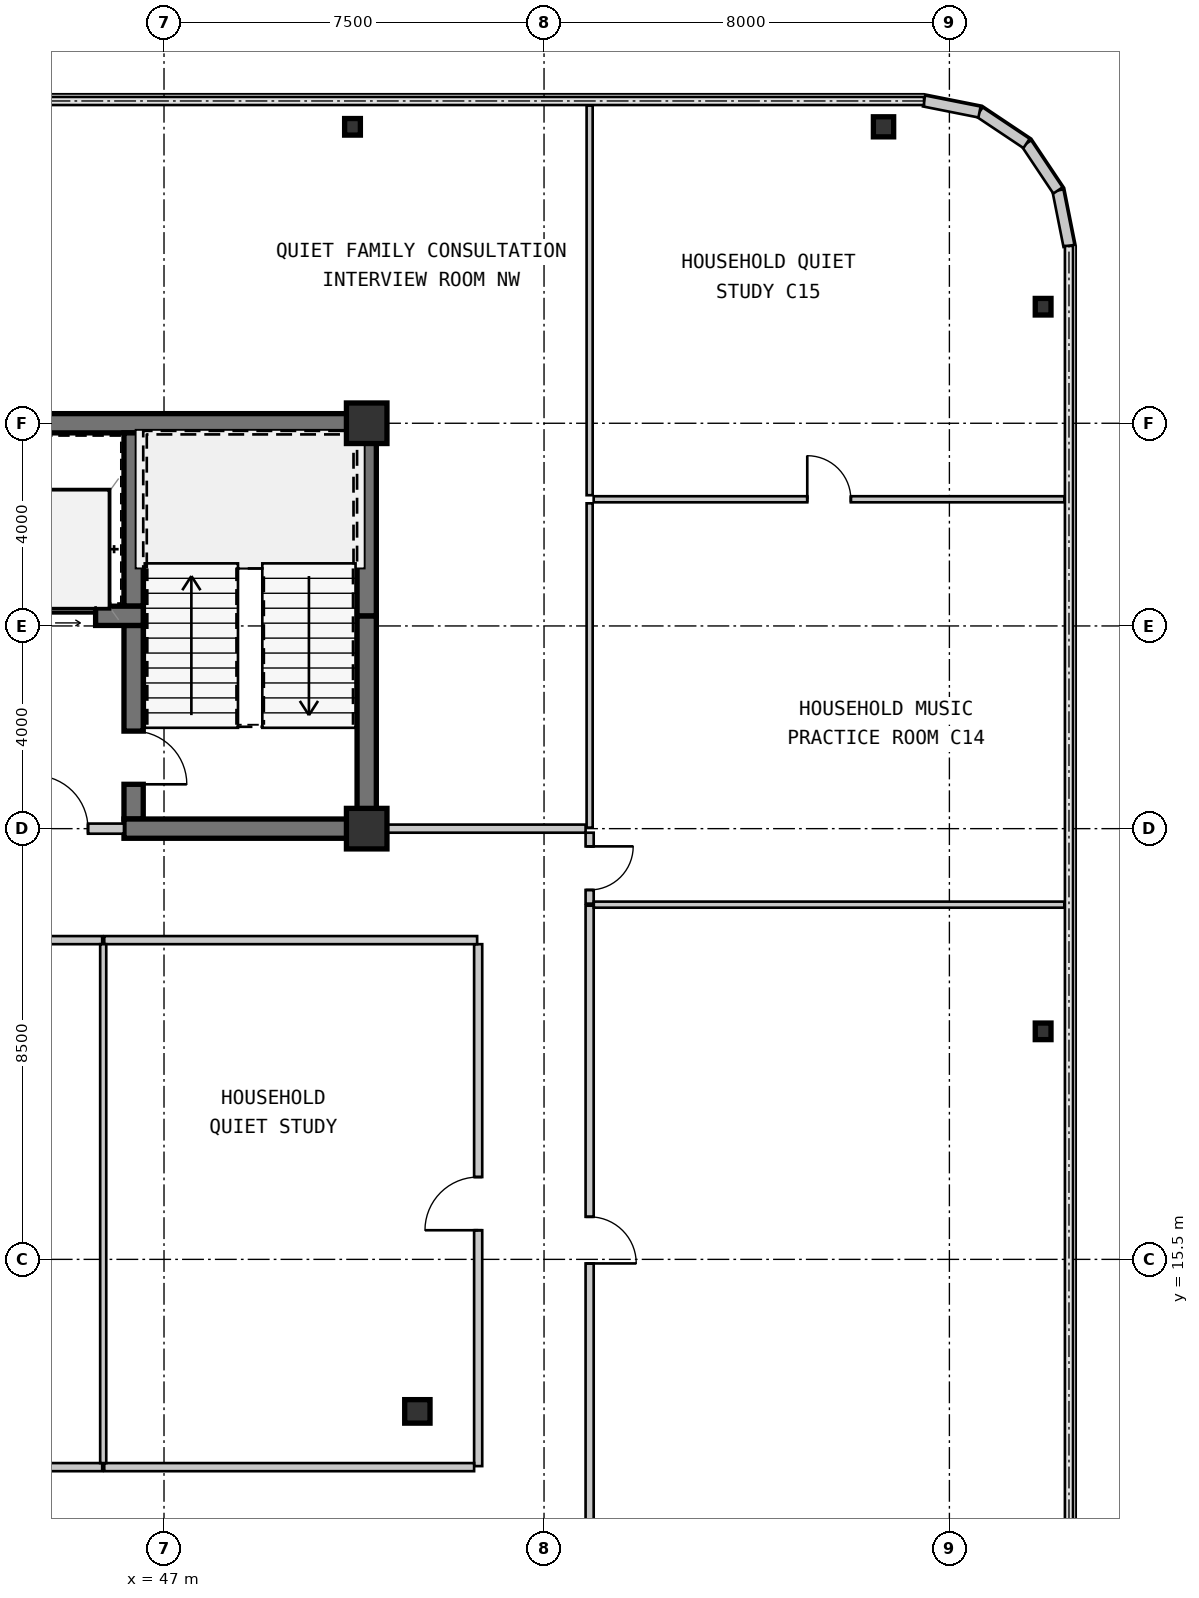
"""IFC4 building model, lengths in metres.
Left out: names, types, materials, properties, quantities, classifications, styles, units other than length and angle.
Written with IfcOpenShell. Run it as: python <this file> out.ifc"""

import sys

from ifc_helpers import new_model, si_unit, direction, frame, frame_2d, origin, origin_2d, place, context, subcontext, project, spatial, rectangle, i_section, extrude, source, transform, mapped, element, fill, save


model = new_model("IFC4")
c1 = context("Model", 3, precision=1e-05, world=origin(), true_north=direction((0.0, 1.0)))
c2 = subcontext(c1, "Body", "Model", "MODEL_VIEW")
j1 = project(units=[si_unit("LENGTHUNIT", "METRE"), si_unit("PLANEANGLEUNIT", "RADIAN")], contexts=[c1])
p1 = place(None, origin())
s1 = spatial("IfcSite", under=j1, at=p1, CompositionType="ELEMENT")
p2 = place(p1, origin())
s2 = spatial("IfcBuilding", under=s1, at=p2, CompositionType="ELEMENT")
p3 = place(p2, frame((0.0, 0.0, 32.55)))
s3 = spatial("IfcBuildingStorey", under=s2, at=p3, CompositionType="ELEMENT", Elevation=32.55)
m1 = source(origin(), c2, "Body", "SweptSolid", [
    extrude(rectangle(XDim=0.8, YDim=0.8, at=origin_2d()), origin(), (0.0, 0.0, 1.0), 3.15),
])
for number, where, z_axis, x_axis in (
    (1, (51.0, 24.0, 0.0), (0.0, 0.0, 1.0), (1.0, 0.0, 0.0)),
    (2, (51.0, 32.0, 0.0), (0.0, 0.0, 1.0), (1.0, 0.0, 0.0)),
):
    element("IfcColumn", number, at=place(p3, frame(where, z_axis=z_axis, x_axis=x_axis)), inside=s3, PredefinedType="COLUMN", context=c2, shape_type="MappedRepresentation", body=[
        mapped(m1, transform((0.0, 0.0, 0.0), scale=1.0)),
    ])
m2 = source(origin(), c2, "Body", "SweptSolid", [
    extrude(i_section(OverallWidth=0.5, OverallDepth=0.464, WebThickness=0.022, FlangeThickness=0.034, at=origin_2d()), origin(), (0.0, 0.0, 1.0), 3.15),
])
p4 = place(p3, frame((52.0, 12.5, 0.0), z_axis=(0.0, 0.0, 1.0), x_axis=(1.0, 0.0, 0.0)))
e3 = element("IfcColumn", 3, at=p4, inside=s3, PredefinedType="COLUMN", context=c2, shape_type="MappedRepresentation", body=[
    mapped(m2, transform((0.0, 0.0, 0.0), scale=1.0)),
])
m3 = source(origin(), c2, "Body", "SweptSolid", [
    extrude(i_section(OverallWidth=0.311, OverallDepth=0.327, WebThickness=0.016, FlangeThickness=0.025, at=origin_2d()), origin(), (0.0, 0.0, 1.0), 3.15),
])
p5 = place(p3, frame((50.72, 37.85, 0.0), z_axis=(0.0, 0.0, 1.0), x_axis=(1.0, 0.0, 0.0)))
e4 = element("IfcColumn", 4, at=p5, inside=s3, PredefinedType="COLUMN", context=c2, shape_type="MappedRepresentation", body=[
    mapped(m3, transform((0.0, 0.0, 0.0), scale=1.0)),
])
m4 = source(origin(), c2, "Body", "SweptSolid", [
    extrude(i_section(OverallWidth=0.4, OverallDepth=0.396, WebThickness=0.022, FlangeThickness=0.034, at=origin_2d()), origin(), (0.0, 0.0, 1.0), 3.15),
])
p6 = place(p3, frame((61.2, 37.85, 0.0), z_axis=(0.0, 0.0, 1.0), x_axis=(1.0, 0.0, 0.0)))
e5 = element("IfcColumn", 5, at=p6, inside=s3, PredefinedType="COLUMN", context=c2, shape_type="MappedRepresentation", body=[
    mapped(m4, transform((0.0, 0.0, 0.0), scale=1.0)),
])
for number, where, z_axis, x_axis in (
    (6, (64.35, 20.0, 0.0), (0.0, 0.0, 1.0), (1.0, 0.0, 0.0)),
    (7, (64.35, 34.3, 0.0), (0.0, 0.0, 1.0), (1.0, 0.0, 0.0)),
):
    element("IfcColumn", number, at=place(p3, frame(where, z_axis=z_axis, x_axis=x_axis)), inside=s3, PredefinedType="COLUMN", context=c2, shape_type="MappedRepresentation", body=[
        mapped(m3, transform((0.0, 0.0, 0.0), scale=1.0)),
    ])
m5 = source(origin(), c2, "Body", "SweptSolid", [
    extrude(rectangle(XDim=1.116, YDim=0.22, at=frame_2d((0.558, 0.0))), origin(), (0.0, 0.0, 1.0), 2.93),
])
for number, where, z_axis, x_axis in (
    (8, (64.86, 35.5, 0.0), (0.0, 0.0, 1.0), (-0.195, 0.981, 0.0)),
    (9, (64.642, 36.594, 0.0), (0.0, 0.0, 1.0), (-0.556, 0.831, 0.0)),
    (10, (64.022, 37.522, 0.0), (0.0, 0.0, 1.0), (-0.831, 0.556, 0.0)),
    (11, (63.094, 38.142, 0.0), (0.0, 0.0, 1.0), (-0.981, 0.195, 0.0)),
):
    element("IfcWall", number, at=place(p3, frame(where, z_axis=z_axis, x_axis=x_axis)), inside=s3, PredefinedType="SOLIDWALL", context=c2, shape_type="MappedRepresentation", body=[
        mapped(m5, transform((0.0, 0.0, 0.0), scale=1.0)),
    ])
m6 = source(origin(), c2, "Body", "SweptSolid", [
    extrude(rectangle(XDim=11.99, YDim=0.38, at=frame_2d((5.995, 0.0))), origin(), (0.0, 0.0, 1.0), 2.93),
])
p7 = place(p3, frame((39.2, 32.0, 0.0), z_axis=(0.0, 0.0, 1.0), x_axis=(1.0, 0.0, 0.0)))
e12 = element("IfcWall", 12, at=p7, inside=s3, PredefinedType="SHEAR", context=c2, shape_type="MappedRepresentation", body=[
    mapped(m6, transform((0.0, 0.0, 0.0), scale=1.0)),
])
m7 = source(origin(), c2, "Body", "SweptSolid", [
    extrude(rectangle(XDim=4.01, YDim=0.38, at=frame_2d((2.005, 0.0))), origin(), (0.0, 0.0, 1.0), 2.93),
])
p8 = place(p3, frame((51.0, 24.19, 0.0), z_axis=(0.0, 0.0, 1.0), x_axis=(0.0, 1.0, 0.0)))
e13 = element("IfcWall", 13, at=p8, inside=s3, PredefinedType="SHEAR", context=c2, shape_type="MappedRepresentation", body=[
    mapped(m7, transform((0.0, 0.0, 0.0), scale=1.0)),
])
m8 = source(origin(), c2, "Body", "SweptSolid", [
    extrude(rectangle(XDim=3.61, YDim=0.38, at=frame_2d((1.805, 0.0))), origin(), (0.0, 0.0, 1.0), 2.93),
])
p9 = place(p3, frame((51.0, 28.2, 0.0), z_axis=(0.0, 0.0, 1.0), x_axis=(0.0, 1.0, 0.0)))
e14 = element("IfcWall", 14, at=p9, inside=s3, PredefinedType="SHEAR", context=c2, shape_type="MappedRepresentation", body=[
    mapped(m8, transform((0.0, 0.0, 0.0), scale=1.0)),
])
m9 = source(origin(), c2, "Body", "SweptSolid", [
    extrude(rectangle(XDim=3.42, YDim=0.38, at=frame_2d((1.71, 0.0))), origin(), (0.0, 0.0, 1.0), 2.93),
])
p10 = place(p3, frame((46.4, 31.81, 0.0), z_axis=(0.0, 0.0, 1.0), x_axis=(0.0, -1.0, 0.0)))
e15 = element("IfcWall", 15, at=p10, inside=s3, PredefinedType="SHEAR", context=c2, shape_type="MappedRepresentation", body=[
    mapped(m9, transform((0.0, 0.0, 0.0), scale=1.0)),
])
m10 = source(origin(), c2, "Body", "SweptSolid", [
    extrude(rectangle(XDim=3.82, YDim=0.38, at=frame_2d((1.91, 0.0))), origin(), (0.0, 0.0, 1.0), 2.93),
])
p11 = place(p3, frame((46.4, 28.01, 0.0), z_axis=(0.0, 0.0, 1.0), x_axis=(0.0, -1.0, 0.0)))
e16 = element("IfcWall", 16, at=p11, inside=s3, PredefinedType="SHEAR", context=c2, shape_type="MappedRepresentation", body=[
    mapped(m10, transform((0.0, 0.0, 0.0), scale=1.0)),
])
m11 = source(origin(), c2, "Body", "SweptSolid", [
    extrude(rectangle(XDim=1.05, YDim=2.1, at=frame_2d((0.525, 1.05))), frame((0.0, 0.2, 0.0), z_axis=(0.0, -1.0, 0.0), x_axis=(1.0, 0.0, 0.0)), (0.0, 0.0, 1.0), 0.4),
])
p12 = place(p11, frame((2.085, 0.0, 0.0)))
e17 = element("IfcOpeningElement", 17, at=p12, cuts=e16, PredefinedType="OPENING", context=c2, shape_type="MappedRepresentation", body=[
    mapped(m11, transform((0.0, 0.0, 0.0), scale=1.0)),
])
m12 = source(origin(), c2, "Body", "SweptSolid", [
    extrude(rectangle(XDim=4.98, YDim=0.38, at=frame_2d((2.49, 0.0))), origin(), (0.0, 0.0, 1.0), 2.93),
])
p13 = place(p3, frame((46.21, 24.0, 0.0), z_axis=(0.0, 0.0, 1.0), x_axis=(1.0, 0.0, 0.0)))
e18 = element("IfcWall", 18, at=p13, inside=s3, PredefinedType="SHEAR", context=c2, shape_type="MappedRepresentation", body=[
    mapped(m12, transform((0.0, 0.0, 0.0), scale=1.0)),
])
m13 = source(origin(), c2, "Body", "SweptSolid", [
    extrude(rectangle(XDim=2.98, YDim=0.38, at=frame_2d((1.49, 0.0))), origin(), (0.0, 0.0, 1.0), 2.93),
])
p14 = place(p3, frame((43.61, 28.2, 0.0), z_axis=(0.0, 0.0, 1.0), x_axis=(1.0, 0.0, 0.0)))
e19 = element("IfcWall", 19, at=p14, inside=s3, PredefinedType="SHEAR", context=c2, shape_type="MappedRepresentation", body=[
    mapped(m13, transform((0.0, 0.0, 0.0), scale=1.0)),
])
m14 = source(origin(), c2, "Body", "SweptSolid", [
    extrude(rectangle(XDim=1.1, YDim=2.15, at=frame_2d((0.55, 1.075))), frame((0.0, 0.2, 0.0), z_axis=(0.0, -1.0, 0.0), x_axis=(1.0, 0.0, 0.0)), (0.0, 0.0, 1.0), 0.4),
])
p15 = place(p14, frame((0.94, 0.0, 0.0)))
e20 = element("IfcOpeningElement", 20, at=p15, cuts=e19, PredefinedType="OPENING", context=c2, shape_type="MappedRepresentation", body=[
    mapped(m14, transform((0.0, 0.0, 0.0), scale=1.0)),
])
m15 = source(origin(), c2, "Body", "SweptSolid", [
    extrude(rectangle(XDim=2.66, YDim=0.2, at=frame_2d((1.33, 0.0))), origin(), (0.0, 0.0, 1.0), 2.397),
])
p16 = place(p3, frame((43.55, 24.0, 0.0), z_axis=(0.0, 0.0, 1.0), x_axis=(1.0, 0.0, 0.0)))
e21 = element("IfcWall", 21, at=p16, inside=s3, PredefinedType="SOLIDWALL", context=c2, shape_type="MappedRepresentation", body=[
    mapped(m15, transform((0.0, 0.0, 0.0), scale=1.0)),
])
m16 = source(origin(), c2, "Body", "SweptSolid", [
    extrude(rectangle(XDim=1.05, YDim=2.1, at=frame_2d((0.525, 1.05))), frame((0.0, 0.11, 0.0), z_axis=(0.0, -1.0, 0.0), x_axis=(1.0, 0.0, 0.0)), (0.0, 0.0, 1.0), 0.22),
])
p17 = place(p16, frame((0.9, 0.0, 0.0)))
e22 = element("IfcOpeningElement", 22, at=p17, cuts=e21, PredefinedType="OPENING", context=c2, shape_type="MappedRepresentation", body=[
    mapped(m16, transform((0.0, 0.0, 0.0), scale=1.0)),
])
m17 = source(origin(), c2, "Body", "SweptSolid", [
    extrude(rectangle(XDim=7.26, YDim=0.16, at=frame_2d((3.63, 0.0))), origin(), (0.0, 0.0, 1.0), 2.93),
])
p18 = place(p3, frame((45.78, 21.8, 0.0), z_axis=(0.0, 0.0, 1.0), x_axis=(-1.0, 0.0, 0.0)))
e23 = element("IfcWall", 23, at=p18, inside=s3, PredefinedType="PARTITIONING", context=c2, shape_type="MappedRepresentation", body=[
    mapped(m17, transform((0.0, 0.0, 0.0), scale=1.0)),
])
m18 = source(origin(), c2, "Body", "SweptSolid", [
    extrude(rectangle(XDim=1.05, YDim=2.1, at=frame_2d((0.525, 1.05))), frame((0.0, 0.09, 0.0), z_axis=(0.0, -1.0, 0.0), x_axis=(1.0, 0.0, 0.0)), (0.0, 0.0, 1.0), 0.18),
])
p19 = place(p18, frame((3.105, 0.0, 0.0)))
e24 = element("IfcOpeningElement", 24, at=p19, cuts=e23, PredefinedType="OPENING", context=c2, shape_type="MappedRepresentation", body=[
    mapped(m18, transform((0.0, 0.0, 0.0), scale=1.0)),
])
m19 = source(origin(), c2, "Body", "SweptSolid", [
    extrude(rectangle(XDim=10.3, YDim=0.16, at=frame_2d((5.15, 0.0))), origin(), (0.0, 0.0, 1.0), 2.93),
])
p20 = place(p3, frame((53.2, 11.42, 0.0), z_axis=(0.0, 0.0, 1.0), x_axis=(0.0, 1.0, 0.0)))
e25 = element("IfcWall", 25, at=p20, inside=s3, PredefinedType="PARTITIONING", context=c2, shape_type="MappedRepresentation", body=[
    mapped(m19, transform((0.0, 0.0, 0.0), scale=1.0)),
])
p21 = place(p20, frame((4.655, 0.0, 0.0)))
e26 = element("IfcOpeningElement", 26, at=p21, cuts=e25, PredefinedType="OPENING", context=c2, shape_type="MappedRepresentation", body=[
    mapped(m18, transform((0.0, 0.0, 0.0), scale=1.0)),
])
m20 = source(origin(), c2, "Body", "SweptSolid", [
    extrude(rectangle(XDim=7.359, YDim=0.16, at=frame_2d((3.68, 0.0))), origin(), (0.0, 0.0, 1.0), 2.93),
])
p22 = place(p3, frame((53.18, 21.8, 0.0), z_axis=(0.0, 0.0, 1.0), x_axis=(-1.0, 0.0, 0.0)))
e27 = element("IfcWall", 27, at=p22, inside=s3, PredefinedType="PARTITIONING", context=c2, shape_type="MappedRepresentation", body=[
    mapped(m20, transform((0.0, 0.0, 0.0), scale=1.0)),
])
m21 = source(origin(), c2, "Body", "SweptSolid", [
    extrude(rectangle(XDim=13.2, YDim=0.16, at=frame_2d((6.6, 0.0))), origin(), (0.0, 0.0, 1.0), 2.93),
])
p23 = place(p3, frame((55.4, 22.48, 0.0), z_axis=(0.0, 0.0, 1.0), x_axis=(0.0, -1.0, 0.0)))
e28 = element("IfcWall", 28, at=p23, inside=s3, PredefinedType="PARTITIONING", context=c2, shape_type="MappedRepresentation", body=[
    mapped(m21, transform((0.0, 0.0, 0.0), scale=1.0)),
])
m22 = source(origin(), c2, "Body", "SweptSolid", [
    extrude(rectangle(XDim=0.92, YDim=2.1, at=frame_2d((0.46, 1.05))), frame((0.0, 0.09, 0.0), z_axis=(0.0, -1.0, 0.0), x_axis=(1.0, 0.0, 0.0)), (0.0, 0.0, 1.0), 0.18),
])
p24 = place(p23, frame((6.14, 0.0, 0.0)))
e29 = element("IfcOpeningElement", 29, at=p24, cuts=e28, PredefinedType="OPENING", context=c2, shape_type="MappedRepresentation", body=[
    mapped(m22, transform((0.0, 0.0, 0.0), scale=1.0)),
])
m23 = source(origin(), c2, "Body", "SweptSolid", [
    extrude(rectangle(XDim=1.4, YDim=0.16, at=frame_2d((0.7, 0.0))), origin(), (0.0, 0.0, 1.0), 2.93),
])
p25 = place(p3, frame((55.4, 23.92, 0.0), z_axis=(0.0, 0.0, 1.0), x_axis=(0.0, -1.0, 0.0)))
e30 = element("IfcWall", 30, at=p25, inside=s3, PredefinedType="PARTITIONING", context=c2, shape_type="MappedRepresentation", body=[
    mapped(m23, transform((0.0, 0.0, 0.0), scale=1.0)),
])
m24 = source(origin(), c2, "Body", "SweptSolid", [
    extrude(rectangle(XDim=0.86, YDim=2.1, at=frame_2d((0.43, 1.05))), frame((0.0, 0.09, 0.0), z_axis=(0.0, -1.0, 0.0), x_axis=(1.0, 0.0, 0.0)), (0.0, 0.0, 1.0), 0.18),
])
p26 = place(p25, frame((0.27, 0.0, 0.0)))
e31 = element("IfcOpeningElement", 31, at=p26, cuts=e30, PredefinedType="OPENING", context=c2, shape_type="MappedRepresentation", body=[
    mapped(m24, transform((0.0, 0.0, 0.0), scale=1.0)),
])
m25 = source(origin(), c2, "Body", "SweptSolid", [
    extrude(rectangle(XDim=4.13, YDim=0.16, at=frame_2d((2.065, 0.0))), origin(), (0.0, 0.0, 1.0), 2.93),
])
p27 = place(p3, frame((51.19, 24.0, 0.0), z_axis=(0.0, 0.0, 1.0), x_axis=(1.0, 0.0, 0.0)))
e32 = element("IfcWall", 32, at=p27, inside=s3, PredefinedType="PARTITIONING", context=c2, shape_type="MappedRepresentation", body=[
    mapped(m25, transform((0.0, 0.0, 0.0), scale=1.0)),
])
p28 = place(p3, frame((38.52, 11.4, 0.0), z_axis=(0.0, 0.0, 1.0), x_axis=(1.0, 0.0, 0.0)))
e33 = element("IfcWall", 33, at=p28, inside=s3, PredefinedType="PARTITIONING", context=c2, shape_type="MappedRepresentation", body=[
    mapped(m17, transform((0.0, 0.0, 0.0), scale=1.0)),
])
m26 = source(origin(), c2, "Body", "SweptSolid", [
    extrude(rectangle(XDim=7.3, YDim=0.16, at=frame_2d((3.65, 0.0))), origin(), (0.0, 0.0, 1.0), 2.93),
])
p29 = place(p3, frame((45.82, 11.4, 0.0), z_axis=(0.0, 0.0, 1.0), x_axis=(1.0, 0.0, 0.0)))
e34 = element("IfcWall", 34, at=p29, inside=s3, PredefinedType="PARTITIONING", context=c2, shape_type="MappedRepresentation", body=[
    mapped(m26, transform((0.0, 0.0, 0.0), scale=1.0)),
])
m27 = source(origin(), c2, "Body", "SweptSolid", [
    extrude(rectangle(XDim=10.24, YDim=0.12, at=frame_2d((5.12, 0.0))), origin(), (0.0, 0.0, 1.0), 2.93),
])
p30 = place(p3, frame((45.8, 21.72, 0.0), z_axis=(0.0, 0.0, 1.0), x_axis=(0.0, -1.0, 0.0)))
e35 = element("IfcWall", 35, at=p30, inside=s3, PredefinedType="PARTITIONING", context=c2, shape_type="MappedRepresentation", body=[
    mapped(m27, transform((0.0, 0.0, 0.0), scale=1.0)),
])
m28 = source(origin(), c2, "Body", "SweptSolid", [
    extrude(rectangle(XDim=9.286, YDim=0.12, at=frame_2d((4.643, 0.0))), origin(), (0.0, 0.0, 1.0), 2.93),
])
p31 = place(p3, frame((55.482, 22.5, 0.0), z_axis=(0.0, 0.0, 1.0), x_axis=(1.0, 0.0, 0.0)))
e36 = element("IfcWall", 36, at=p31, inside=s3, PredefinedType="PARTITIONING", context=c2, shape_type="MappedRepresentation", body=[
    mapped(m28, transform((0.0, 0.0, 0.0), scale=1.0)),
])
m29 = source(origin(), c2, "Body", "SweptSolid", [
    extrude(rectangle(XDim=9.29, YDim=0.12, at=frame_2d((4.645, 0.0))), origin(), (0.0, 0.0, 1.0), 2.93),
])
p32 = place(p3, frame((55.48, 30.5, 0.0), z_axis=(0.0, 0.0, 1.0), x_axis=(1.0, 0.0, 0.0)))
e37 = element("IfcWall", 37, at=p32, inside=s3, PredefinedType="PARTITIONING", context=c2, shape_type="MappedRepresentation", body=[
    mapped(m29, transform((0.0, 0.0, 0.0), scale=1.0)),
])
m30 = source(origin(), c2, "Body", "SweptSolid", [
    extrude(rectangle(XDim=0.86, YDim=2.1, at=frame_2d((0.43, 1.05))), frame((0.0, 0.07, 0.0), z_axis=(0.0, -1.0, 0.0), x_axis=(1.0, 0.0, 0.0)), (0.0, 0.0, 1.0), 0.14),
])
p33 = place(p32, frame((4.215, 0.0, 0.0)))
e38 = element("IfcOpeningElement", 38, at=p33, cuts=e37, PredefinedType="OPENING", context=c2, shape_type="MappedRepresentation", body=[
    mapped(m30, transform((0.0, 0.0, 0.0), scale=1.0)),
])
m31 = source(origin(), c2, "Body", "SweptSolid", [
    extrude(rectangle(XDim=6.4, YDim=0.12, at=frame_2d((3.2, 0.0))), origin(), (0.0, 0.0, 1.0), 2.93),
])
p34 = place(p3, frame((55.4, 24.02, 0.0), z_axis=(0.0, 0.0, 1.0), x_axis=(0.0, 1.0, 0.0)))
e39 = element("IfcWall", 39, at=p34, inside=s3, PredefinedType="PARTITIONING", context=c2, shape_type="MappedRepresentation", body=[
    mapped(m31, transform((0.0, 0.0, 0.0), scale=1.0)),
])
m32 = source(origin(), c2, "Body", "SweptSolid", [
    extrude(rectangle(XDim=7.69, YDim=0.12, at=frame_2d((3.845, 0.0))), origin(), (0.0, 0.0, 1.0), 2.93),
])
p35 = place(p3, frame((55.4, 30.58, 0.0), z_axis=(0.0, 0.0, 1.0), x_axis=(0.0, 1.0, 0.0)))
e40 = element("IfcWall", 40, at=p35, inside=s3, PredefinedType="PARTITIONING", context=c2, shape_type="MappedRepresentation", body=[
    mapped(m32, transform((0.0, 0.0, 0.0), scale=1.0)),
])
m33 = source(origin(), c2, "Body", "SweptSolid", [
    extrude(rectangle(XDim=1.05, YDim=2.1, at=frame_2d((0.525, 1.05))), frame((0.0, 0.025, 0.0), z_axis=(0.0, -1.0, 0.0), x_axis=(1.0, 0.0, 0.0)), (0.0, 0.0, 1.0), 0.05),
])
p36 = place(p12, origin())
e41 = element("IfcDoor", 41, at=p36, inside=s3, OperationType="SINGLE_SWING_RIGHT", PredefinedType="DOOR", context=c2, shape_type="MappedRepresentation", body=[
    mapped(m33, transform((0.0, 0.0, 0.0), scale=1.0)),
])
fill(e17, e41)
m34 = source(origin(), c2, "Body", "SweptSolid", [
    extrude(rectangle(XDim=1.1, YDim=2.15, at=frame_2d((0.55, 1.075))), frame((0.0, 0.025, 0.0), z_axis=(0.0, -1.0, 0.0), x_axis=(1.0, 0.0, 0.0)), (0.0, 0.0, 1.0), 0.05),
])
p37 = place(p15, origin())
e42 = element("IfcDoor", 42, at=p37, inside=s3, OperationType="SLIDING_TO_LEFT", PredefinedType="DOOR", context=c2, shape_type="MappedRepresentation", body=[
    mapped(m34, transform((0.0, 0.0, 0.0), scale=1.0)),
])
fill(e20, e42)
p38 = place(p17, origin())
e43 = element("IfcDoor", 43, at=p38, inside=s3, OperationType="SINGLE_SWING_LEFT", PredefinedType="DOOR", context=c2, shape_type="MappedRepresentation", body=[
    mapped(m33, transform((0.0, 0.0, 0.0), scale=1.0)),
])
fill(e22, e43)
p39 = place(p21, origin())
e44 = element("IfcDoor", 44, at=p39, inside=s3, OperationType="SINGLE_SWING_LEFT", PredefinedType="DOOR", context=c2, shape_type="MappedRepresentation", body=[
    mapped(m33, transform((0.0, 0.0, 0.0), scale=1.0)),
])
fill(e26, e44)
m35 = source(origin(), c2, "Body", "SweptSolid", [
    extrude(rectangle(XDim=0.92, YDim=2.1, at=frame_2d((0.46, 1.05))), frame((0.0, 0.025, 0.0), z_axis=(0.0, -1.0, 0.0), x_axis=(1.0, 0.0, 0.0)), (0.0, 0.0, 1.0), 0.05),
])
p40 = place(p24, origin())
e45 = element("IfcDoor", 45, at=p40, inside=s3, OperationType="SINGLE_SWING_RIGHT", PredefinedType="DOOR", context=c2, shape_type="MappedRepresentation", body=[
    mapped(m35, transform((0.0, 0.0, 0.0), scale=1.0)),
])
fill(e29, e45)
m36 = source(origin(), c2, "Body", "SweptSolid", [
    extrude(rectangle(XDim=0.86, YDim=2.1, at=frame_2d((0.43, 1.05))), frame((0.0, 0.025, 0.0), z_axis=(0.0, -1.0, 0.0), x_axis=(1.0, 0.0, 0.0)), (0.0, 0.0, 1.0), 0.05),
])
p41 = place(p26, origin())
e46 = element("IfcDoor", 46, at=p41, inside=s3, OperationType="SINGLE_SWING_LEFT", PredefinedType="DOOR", context=c2, shape_type="MappedRepresentation", body=[
    mapped(m36, transform((0.0, 0.0, 0.0), scale=1.0)),
])
fill(e31, e46)
p42 = place(p33, origin())
e47 = element("IfcDoor", 47, at=p42, inside=s3, OperationType="SINGLE_SWING_LEFT", PredefinedType="DOOR", context=c2, shape_type="MappedRepresentation", body=[
    mapped(m36, transform((0.0, 0.0, 0.0), scale=1.0)),
])
fill(e38, e47)
save(model, sys.argv[1])
